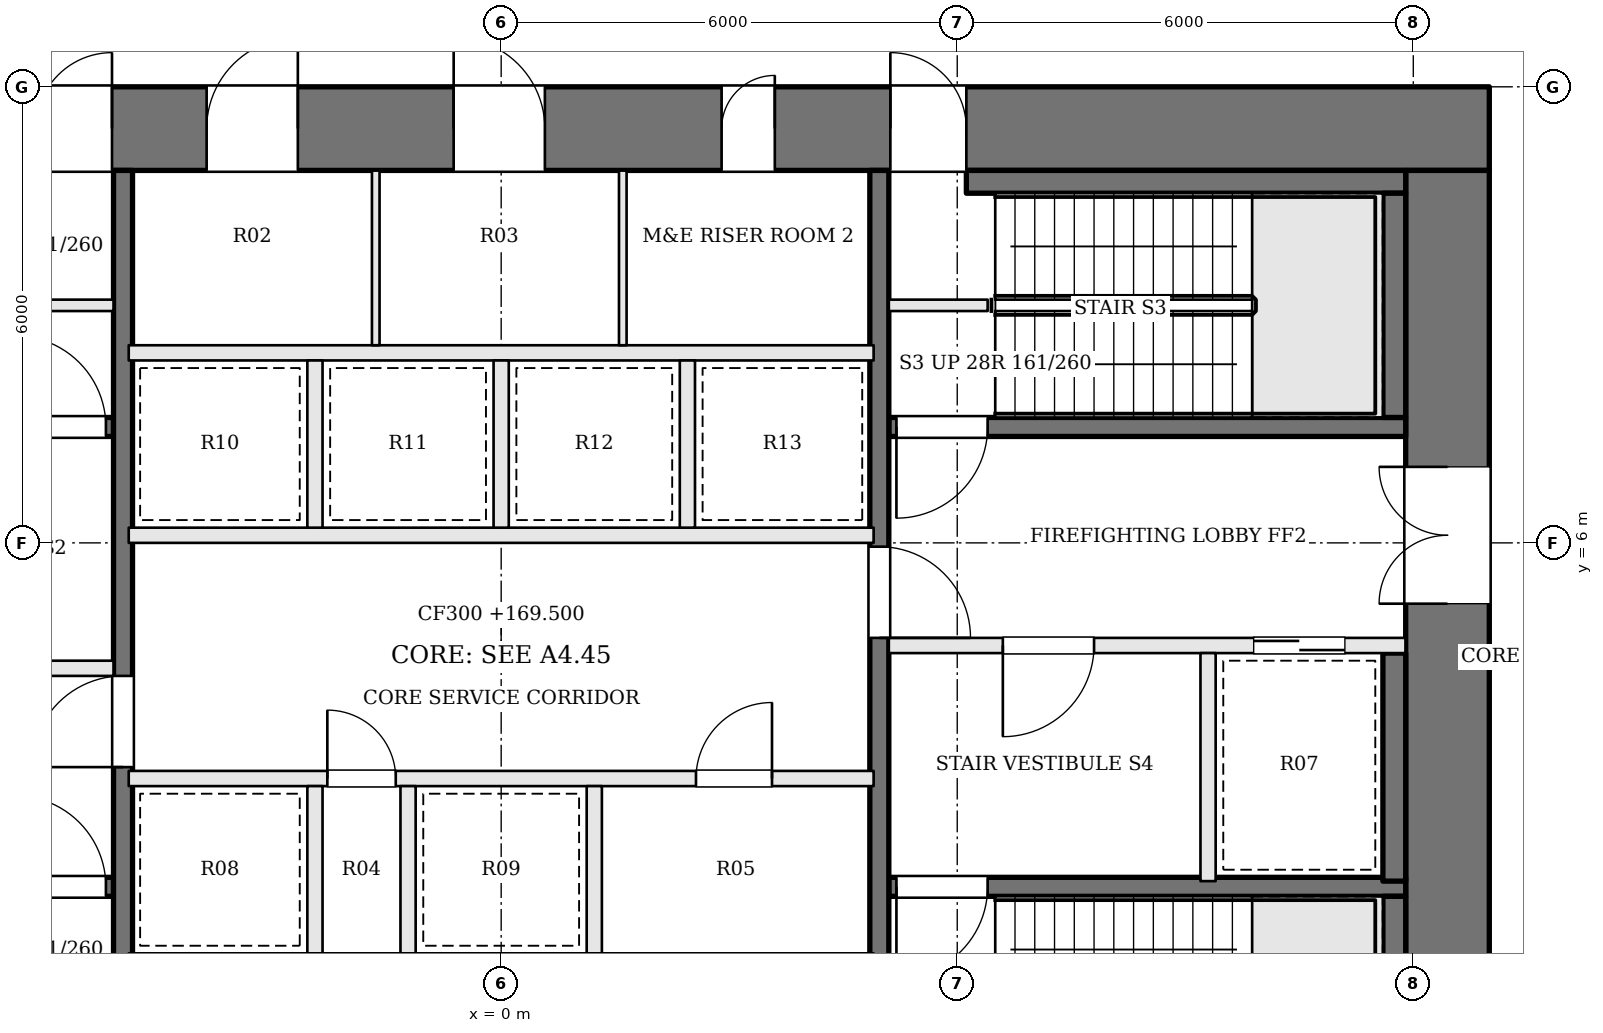
"""IFC4 building model, lengths in metres.
Left out: names, types, materials, properties, quantities, classifications, styles, units other than length and angle.
Written with IfcOpenShell. Run it as: python <this file> out.ifc"""

import sys

from ifc_helpers import new_model, si_unit, direction, frame, frame_2d, origin, place, context, subcontext, project, spatial, rectangle, extrude, element, fill, save


model = new_model("IFC4")
c1 = context("Model", 3, precision=1e-05, world=origin(), true_north=direction((0.0, 1.0)))
c2 = subcontext(c1, "Body", "Model", "MODEL_VIEW")
j1 = project(units=[si_unit("LENGTHUNIT", "METRE"), si_unit("PLANEANGLEUNIT", "RADIAN")], contexts=[c1])
p1 = place(None, origin())
s1 = spatial("IfcSite", under=j1, at=p1, CompositionType="ELEMENT")
p2 = place(p1, origin())
s2 = spatial("IfcBuilding", under=s1, at=p2, CompositionType="ELEMENT")
p3 = place(p2, frame((0.0, 0.0, 169.5)))
s3 = spatial("IfcBuildingStorey", under=s2, at=p3, CompositionType="ELEMENT", Elevation=169.5)
p4 = place(p3, frame((-13.0, 11.45, 0.0), z_axis=(0.0, 0.0, 1.0), x_axis=(1.0, 0.0, 0.0)))
e1 = element("IfcWall", 1, at=p4, inside=s3, PredefinedType="SHEAR", context=c2, shape_type="SweptSolid", body=[
    extrude(rectangle(XDim=26.0, YDim=1.1, at=frame_2d((13.0, 0.0))), origin(), (0.0, 0.0, 1.0), 4.5),
])
p5 = place(p4, frame((9.125, 0.0, 0.0)))
e2 = element("IfcOpeningElement", 2, at=p5, cuts=e1, PredefinedType="OPENING", context=c2, shape_type="SweptSolid", body=[
    extrude(rectangle(XDim=1.2, YDim=2.1, at=frame_2d((0.6, 1.05))), frame((0.0, 0.56, 0.0), z_axis=(0.0, -1.0, 0.0), x_axis=(1.0, 0.0, 0.0)), (0.0, 0.0, 1.0), 1.12),
])
p6 = place(p4, frame((12.375, 0.0, 0.0)))
e3 = element("IfcOpeningElement", 3, at=p6, cuts=e1, PredefinedType="OPENING", context=c2, shape_type="SweptSolid", body=[
    extrude(rectangle(XDim=1.2, YDim=2.1, at=frame_2d((0.6, 1.05))), frame((0.0, 0.56, 0.0), z_axis=(0.0, -1.0, 0.0), x_axis=(1.0, 0.0, 0.0)), (0.0, 0.0, 1.0), 1.12),
])
p7 = place(p4, frame((15.9, 0.0, 0.0)))
e4 = element("IfcOpeningElement", 4, at=p7, cuts=e1, PredefinedType="OPENING", context=c2, shape_type="SweptSolid", body=[
    extrude(rectangle(XDim=0.7, YDim=2.1, at=frame_2d((0.35, 1.05))), frame((0.0, 0.56, 0.0), z_axis=(0.0, -1.0, 0.0), x_axis=(1.0, 0.0, 0.0)), (0.0, 0.0, 1.0), 1.12),
])
p8 = place(p4, frame((6.88, 0.0, 0.0)))
e5 = element("IfcOpeningElement", 5, at=p8, cuts=e1, PredefinedType="OPENING", context=c2, shape_type="SweptSolid", body=[
    extrude(rectangle(XDim=1.0, YDim=2.1, at=frame_2d((0.5, 1.05))), frame((0.0, 0.56, 0.0), z_axis=(0.0, -1.0, 0.0), x_axis=(1.0, 0.0, 0.0)), (0.0, 0.0, 1.0), 1.12),
])
p9 = place(p4, frame((18.12, 0.0, 0.0)))
e6 = element("IfcOpeningElement", 6, at=p9, cuts=e1, PredefinedType="OPENING", context=c2, shape_type="SweptSolid", body=[
    extrude(rectangle(XDim=1.0, YDim=2.1, at=frame_2d((0.5, 1.05))), frame((0.0, 0.56, 0.0), z_axis=(0.0, -1.0, 0.0), x_axis=(1.0, 0.0, 0.0)), (0.0, 0.0, 1.0), 1.12),
])
p10 = place(p3, frame((12.45, -1.9, 0.0), z_axis=(0.0, 0.0, 1.0), x_axis=(0.0, 1.0, 0.0)))
e7 = element("IfcWall", 7, at=p10, inside=s3, PredefinedType="SHEAR", context=c2, shape_type="SweptSolid", body=[
    extrude(rectangle(XDim=12.8, YDim=1.1, at=frame_2d((6.4, 0.0))), origin(), (0.0, 0.0, 1.0), 4.5),
])
p11 = place(p10, frame((7.1, 0.0, 0.0)))
e8 = element("IfcOpeningElement", 8, at=p11, cuts=e7, PredefinedType="OPENING", context=c2, shape_type="SweptSolid", body=[
    extrude(rectangle(XDim=1.8, YDim=2.1, at=frame_2d((0.9, 1.05))), frame((0.0, 0.56, 0.0), z_axis=(0.0, -1.0, 0.0), x_axis=(1.0, 0.0, 0.0)), (0.0, 0.0, 1.0), 1.12),
])
for number, where, z_axis, x_axis in (
    (9, (6.4, 9.125, 0.0), (0.0, 0.0, 1.0), (-1.0, 0.0, 0.0)),
    (10, (-6.4, 9.125, 0.0), (0.0, 0.0, 1.0), (1.0, 0.0, 0.0)),
):
    element("IfcWall", number, at=place(p3, frame(where, z_axis=z_axis, x_axis=x_axis)), inside=s3, PredefinedType="SOLIDWALL", context=c2, shape_type="SweptSolid", body=[
        extrude(rectangle(XDim=1.3, YDim=0.15, at=frame_2d((0.65, 0.0))), origin(), (0.0, 0.0, 1.0), 4.3),
    ])
p12 = place(p3, frame((-11.9, 1.475, 0.0), z_axis=(0.0, 0.0, 1.0), x_axis=(1.0, 0.0, 0.0)))
e11 = element("IfcWall", 11, at=p12, inside=s3, PredefinedType="SOLIDWALL", context=c2, shape_type="SweptSolid", body=[
    extrude(rectangle(XDim=6.8, YDim=0.25, at=frame_2d((3.4, 0.0))), origin(), (0.0, 0.0, 1.0), 4.3),
])
p13 = place(p12, frame((5.5, 0.0, 0.0)))
e12 = element("IfcOpeningElement", 12, at=p13, cuts=e11, PredefinedType="OPENING", context=c2, shape_type="SweptSolid", body=[
    extrude(rectangle(XDim=1.2, YDim=2.1, at=frame_2d((0.6, 1.05))), frame((0.0, 0.135, 0.0), z_axis=(0.0, -1.0, 0.0), x_axis=(1.0, 0.0, 0.0)), (0.0, 0.0, 1.0), 0.27),
])
p14 = place(p3, frame((11.9, 7.525, 0.0), z_axis=(0.0, 0.0, 1.0), x_axis=(-1.0, 0.0, 0.0)))
e13 = element("IfcWall", 13, at=p14, inside=s3, PredefinedType="SOLIDWALL", context=c2, shape_type="SweptSolid", body=[
    extrude(rectangle(XDim=6.8, YDim=0.25, at=frame_2d((3.4, 0.0))), origin(), (0.0, 0.0, 1.0), 4.3),
])
p15 = place(p14, frame((5.5, 0.0, 0.0)))
e14 = element("IfcOpeningElement", 14, at=p15, cuts=e13, PredefinedType="OPENING", context=c2, shape_type="SweptSolid", body=[
    extrude(rectangle(XDim=1.2, YDim=2.1, at=frame_2d((0.6, 1.05))), frame((0.0, 0.135, 0.0), z_axis=(0.0, -1.0, 0.0), x_axis=(1.0, 0.0, 0.0)), (0.0, 0.0, 1.0), 0.27),
])
p16 = place(p3, frame((-11.9, 4.35, 0.0), z_axis=(0.0, 0.0, 1.0), x_axis=(1.0, 0.0, 0.0)))
e15 = element("IfcWall", 15, at=p16, inside=s3, PredefinedType="SOLIDWALL", context=c2, shape_type="SweptSolid", body=[
    extrude(rectangle(XDim=6.8, YDim=0.2, at=frame_2d((3.4, 0.0))), origin(), (0.0, 0.0, 1.0), 4.3),
])
p17 = place(p16, frame((4.1, 0.0, 0.0)))
e16 = element("IfcOpeningElement", 16, at=p17, cuts=e15, PredefinedType="OPENING", context=c2, shape_type="SweptSolid", body=[
    extrude(rectangle(XDim=1.2, YDim=2.1, at=frame_2d((0.6, 1.05))), frame((0.0, 0.11, 0.0), z_axis=(0.0, -1.0, 0.0), x_axis=(1.0, 0.0, 0.0)), (0.0, 0.0, 1.0), 0.22),
])
p18 = place(p16, frame((0.8, 0.0, 0.0)))
e17 = element("IfcOpeningElement", 17, at=p18, cuts=e15, PredefinedType="OPENING", context=c2, shape_type="SweptSolid", body=[
    extrude(rectangle(XDim=1.2, YDim=2.1, at=frame_2d((0.6, 1.05))), frame((0.0, 0.11, 0.0), z_axis=(0.0, -1.0, 0.0), x_axis=(1.0, 0.0, 0.0)), (0.0, 0.0, 1.0), 0.22),
])
p19 = place(p3, frame((11.9, 4.65, 0.0), z_axis=(0.0, 0.0, 1.0), x_axis=(-1.0, 0.0, 0.0)))
e18 = element("IfcWall", 18, at=p19, inside=s3, PredefinedType="SOLIDWALL", context=c2, shape_type="SweptSolid", body=[
    extrude(rectangle(XDim=6.8, YDim=0.2, at=frame_2d((3.4, 0.0))), origin(), (0.0, 0.0, 1.0), 4.3),
])
p20 = place(p19, frame((4.1, 0.0, 0.0)))
e19 = element("IfcOpeningElement", 19, at=p20, cuts=e18, PredefinedType="OPENING", context=c2, shape_type="SweptSolid", body=[
    extrude(rectangle(XDim=1.2, YDim=2.1, at=frame_2d((0.6, 1.05))), frame((0.0, 0.11, 0.0), z_axis=(0.0, -1.0, 0.0), x_axis=(1.0, 0.0, 0.0)), (0.0, 0.0, 1.0), 0.22),
])
p21 = place(p19, frame((0.8, 0.0, 0.0)))
e20 = element("IfcOpeningElement", 20, at=p21, cuts=e18, PredefinedType="OPENING", context=c2, shape_type="SweptSolid", body=[
    extrude(rectangle(XDim=1.2, YDim=2.1, at=frame_2d((0.6, 1.05))), frame((0.0, 0.11, 0.0), z_axis=(0.0, -1.0, 0.0), x_axis=(1.0, 0.0, 0.0)), (0.0, 0.0, 1.0), 0.22),
])
p22 = place(p3, frame((-11.9, 7.525, 0.0), z_axis=(0.0, 0.0, 1.0), x_axis=(1.0, 0.0, 0.0)))
e21 = element("IfcWall", 21, at=p22, inside=s3, PredefinedType="SOLIDWALL", context=c2, shape_type="SweptSolid", body=[
    extrude(rectangle(XDim=6.8, YDim=0.25, at=frame_2d((3.4, 0.0))), origin(), (0.0, 0.0, 1.0), 4.3),
])
p23 = place(p22, frame((5.5, 0.0, 0.0)))
e22 = element("IfcOpeningElement", 22, at=p23, cuts=e21, PredefinedType="OPENING", context=c2, shape_type="SweptSolid", body=[
    extrude(rectangle(XDim=1.2, YDim=2.1, at=frame_2d((0.6, 1.05))), frame((0.0, 0.135, 0.0), z_axis=(0.0, -1.0, 0.0), x_axis=(1.0, 0.0, 0.0)), (0.0, 0.0, 1.0), 0.27),
])
p24 = place(p3, frame((11.9, 1.475, 0.0), z_axis=(0.0, 0.0, 1.0), x_axis=(-1.0, 0.0, 0.0)))
e23 = element("IfcWall", 23, at=p24, inside=s3, PredefinedType="SOLIDWALL", context=c2, shape_type="SweptSolid", body=[
    extrude(rectangle(XDim=6.8, YDim=0.25, at=frame_2d((3.4, 0.0))), origin(), (0.0, 0.0, 1.0), 4.3),
])
p25 = place(p24, frame((5.5, 0.0, 0.0)))
e24 = element("IfcOpeningElement", 24, at=p25, cuts=e23, PredefinedType="OPENING", context=c2, shape_type="SweptSolid", body=[
    extrude(rectangle(XDim=1.2, YDim=2.1, at=frame_2d((0.6, 1.05))), frame((0.0, 0.135, 0.0), z_axis=(0.0, -1.0, 0.0), x_axis=(1.0, 0.0, 0.0)), (0.0, 0.0, 1.0), 0.27),
])
p26 = place(p3, frame((9.3, 4.55, 0.0), z_axis=(0.0, 0.0, 1.0), x_axis=(0.0, -1.0, 0.0)))
e25 = element("IfcWall", 25, at=p26, inside=s3, PredefinedType="SOLIDWALL", context=c2, shape_type="SweptSolid", body=[
    extrude(rectangle(XDim=3.0, YDim=0.2, at=frame_2d((1.5, 0.0))), origin(), (0.0, 0.0, 1.0), 4.3),
])
p27 = place(p3, frame((-4.975, -1.9, 0.0), z_axis=(0.0, 0.0, 1.0), x_axis=(0.0, 1.0, 0.0)))
e26 = element("IfcWall", 26, at=p27, inside=s3, PredefinedType="SOLIDWALL", context=c2, shape_type="SweptSolid", body=[
    extrude(rectangle(XDim=12.8, YDim=0.25, at=frame_2d((6.4, 0.0))), origin(), (0.0, 0.0, 1.0), 4.3),
])
p28 = place(p27, frame((4.95, 0.0, 0.0)))
e27 = element("IfcOpeningElement", 27, at=p28, cuts=e26, PredefinedType="OPENING", context=c2, shape_type="SweptSolid", body=[
    extrude(rectangle(XDim=1.2, YDim=2.1, at=frame_2d((0.6, 1.05))), frame((0.0, 0.135, 0.0), z_axis=(0.0, -1.0, 0.0), x_axis=(1.0, 0.0, 0.0)), (0.0, 0.0, 1.0), 0.27),
])
p29 = place(p3, frame((4.975, 10.9, 0.0), z_axis=(0.0, 0.0, 1.0), x_axis=(0.0, -1.0, 0.0)))
e28 = element("IfcWall", 28, at=p29, inside=s3, PredefinedType="SOLIDWALL", context=c2, shape_type="SweptSolid", body=[
    extrude(rectangle(XDim=12.8, YDim=0.25, at=frame_2d((6.4, 0.0))), origin(), (0.0, 0.0, 1.0), 4.3),
])
p30 = place(p29, frame((4.95, 0.0, 0.0)))
e29 = element("IfcOpeningElement", 29, at=p30, cuts=e28, PredefinedType="OPENING", context=c2, shape_type="SweptSolid", body=[
    extrude(rectangle(XDim=1.2, YDim=2.1, at=frame_2d((0.6, 1.05))), frame((0.0, 0.135, 0.0), z_axis=(0.0, -1.0, 0.0), x_axis=(1.0, 0.0, 0.0)), (0.0, 0.0, 1.0), 0.27),
])
p31 = place(p3, frame((11.9, 10.75, 0.0), z_axis=(0.0, 0.0, 1.0), x_axis=(-1.0, 0.0, 0.0)))
e30 = element("IfcWall", 30, at=p31, inside=s3, PredefinedType="SOLIDWALL", context=c2, shape_type="SweptSolid", body=[
    extrude(rectangle(XDim=5.78, YDim=0.3, at=frame_2d((2.89, 0.0))), origin(), (0.0, 0.0, 1.0), 4.3),
])
p32 = place(p3, frame((11.75, 10.6, 0.0), z_axis=(0.0, 0.0, 1.0), x_axis=(0.0, -1.0, 0.0)))
e31 = element("IfcWall", 31, at=p32, inside=s3, PredefinedType="SOLIDWALL", context=c2, shape_type="SweptSolid", body=[
    extrude(rectangle(XDim=2.95, YDim=0.3, at=frame_2d((1.475, 0.0))), origin(), (0.0, 0.0, 1.0), 4.3),
])
p33 = place(p3, frame((11.75, 4.55, 0.0), z_axis=(0.0, 0.0, 1.0), x_axis=(0.0, -1.0, 0.0)))
e32 = element("IfcWall", 32, at=p33, inside=s3, PredefinedType="SOLIDWALL", context=c2, shape_type="SweptSolid", body=[
    extrude(rectangle(XDim=3.0, YDim=0.3, at=frame_2d((1.5, 0.0))), origin(), (0.0, 0.0, 1.0), 4.3),
])
p34 = place(p3, frame((11.75, 1.35, 0.0), z_axis=(0.0, 0.0, 1.0), x_axis=(0.0, -1.0, 0.0)))
e33 = element("IfcWall", 33, at=p34, inside=s3, PredefinedType="SOLIDWALL", context=c2, shape_type="SweptSolid", body=[
    extrude(rectangle(XDim=2.95, YDim=0.3, at=frame_2d((1.475, 0.0))), origin(), (0.0, 0.0, 1.0), 4.3),
])
p35 = place(p3, frame((-4.9, 2.9, 0.0), z_axis=(0.0, 0.0, 1.0), x_axis=(1.0, 0.0, 0.0)))
e34 = element("IfcWall", 34, at=p35, inside=s3, PredefinedType="SOLIDWALL", context=c2, shape_type="SweptSolid", body=[
    extrude(rectangle(XDim=9.8, YDim=0.2, at=frame_2d((4.9, 0.0))), origin(), (0.0, 0.0, 1.0), 4.3),
])
p36 = place(p35, frame((2.613, 0.0, 0.0)))
e35 = element("IfcOpeningElement", 35, at=p36, cuts=e34, PredefinedType="OPENING", context=c2, shape_type="SweptSolid", body=[
    extrude(rectangle(XDim=0.9, YDim=2.1, at=frame_2d((0.45, 1.05))), frame((0.0, 0.11, 0.0), z_axis=(0.0, -1.0, 0.0), x_axis=(1.0, 0.0, 0.0)), (0.0, 0.0, 1.0), 0.22),
])
p37 = place(p35, frame((7.463, 0.0, 0.0)))
e36 = element("IfcOpeningElement", 36, at=p37, cuts=e34, PredefinedType="OPENING", context=c2, shape_type="SweptSolid", body=[
    extrude(rectangle(XDim=1.0, YDim=2.1, at=frame_2d((0.5, 1.05))), frame((0.0, 0.11, 0.0), z_axis=(0.0, -1.0, 0.0), x_axis=(1.0, 0.0, 0.0)), (0.0, 0.0, 1.0), 0.22),
])
for number, where, z_axis, x_axis in (
    (37, (-4.9, 6.1, 0.0), (0.0, 0.0, 1.0), (1.0, 0.0, 0.0)),
    (38, (-4.9, 8.5, 0.0), (0.0, 0.0, 1.0), (1.0, 0.0, 0.0)),
):
    element("IfcWall", number, at=place(p3, frame(where, z_axis=z_axis, x_axis=x_axis)), inside=s3, PredefinedType="SOLIDWALL", context=c2, shape_type="SweptSolid", body=[
        extrude(rectangle(XDim=9.8, YDim=0.2, at=frame_2d((4.9, 0.0))), origin(), (0.0, 0.0, 1.0), 4.3),
    ])
for number, where, z_axis, x_axis in (
    (39, (-2.45, 0.6, 0.0), (0.0, 0.0, 1.0), (0.0, 1.0, 0.0)),
    (40, (-1.225, 0.6, 0.0), (0.0, 0.0, 1.0), (0.0, 1.0, 0.0)),
    (41, (1.225, 0.6, 0.0), (0.0, 0.0, 1.0), (0.0, 1.0, 0.0)),
    (42, (-2.45, 6.2, 0.0), (0.0, 0.0, 1.0), (0.0, 1.0, 0.0)),
    (43, (0.0, 6.2, 0.0), (0.0, 0.0, 1.0), (0.0, 1.0, 0.0)),
    (44, (2.45, 6.2, 0.0), (0.0, 0.0, 1.0), (0.0, 1.0, 0.0)),
):
    element("IfcWall", number, at=place(p3, frame(where, z_axis=z_axis, x_axis=x_axis)), inside=s3, PredefinedType="SOLIDWALL", context=c2, shape_type="SweptSolid", body=[
        extrude(rectangle(XDim=2.2, YDim=0.2, at=frame_2d((1.1, 0.0))), origin(), (0.0, 0.0, 1.0), 4.3),
    ])
for number, where, z_axis, x_axis in (
    (45, (-1.65, 8.6, 0.0), (0.0, 0.0, 1.0), (0.0, 1.0, 0.0)),
    (46, (1.6, 8.6, 0.0), (0.0, 0.0, 1.0), (0.0, 1.0, 0.0)),
):
    element("IfcWall", number, at=place(p3, frame(where, z_axis=z_axis, x_axis=x_axis)), inside=s3, PredefinedType="PARTITIONING", context=c2, shape_type="SweptSolid", body=[
        extrude(rectangle(XDim=2.3, YDim=0.1, at=frame_2d((1.15, 0.0))), origin(), (0.0, 0.0, 1.0), 4.3),
    ])
p38 = place(p11, origin())
e47 = element("IfcDoor", 47, at=p38, inside=s3, OperationType="DOUBLE_DOOR_SINGLE_SWING", PredefinedType="DOOR", context=c2, shape_type="SweptSolid", body=[
    extrude(rectangle(XDim=1.8, YDim=2.1, at=frame_2d((0.9, 1.05))), frame((0.0, 0.025, 0.0), z_axis=(0.0, -1.0, 0.0), x_axis=(1.0, 0.0, 0.0)), (0.0, 0.0, 1.0), 0.05),
])
fill(e8, e47)
p39 = place(p28, origin())
e48 = element("IfcDoor", 48, at=p39, inside=s3, OperationType="SINGLE_SWING_LEFT", PredefinedType="DOOR", context=c2, shape_type="SweptSolid", body=[
    extrude(rectangle(XDim=1.2, YDim=2.1, at=frame_2d((0.6, 1.05))), frame((0.0, 0.025, 0.0), z_axis=(0.0, -1.0, 0.0), x_axis=(1.0, 0.0, 0.0)), (0.0, 0.0, 1.0), 0.05),
])
fill(e27, e48)
p40 = place(p30, origin())
e49 = element("IfcDoor", 49, at=p40, inside=s3, OperationType="SINGLE_SWING_RIGHT", PredefinedType="DOOR", context=c2, shape_type="SweptSolid", body=[
    extrude(rectangle(XDim=1.2, YDim=2.1, at=frame_2d((0.6, 1.05))), frame((0.0, 0.025, 0.0), z_axis=(0.0, -1.0, 0.0), x_axis=(1.0, 0.0, 0.0)), (0.0, 0.0, 1.0), 0.05),
])
fill(e29, e49)
p41 = place(p20, origin())
e50 = element("IfcDoor", 50, at=p41, inside=s3, OperationType="SINGLE_SWING_RIGHT", PredefinedType="DOOR", context=c2, shape_type="SweptSolid", body=[
    extrude(rectangle(XDim=1.2, YDim=2.1, at=frame_2d((0.6, 1.05))), frame((0.0, 0.025, 0.0), z_axis=(0.0, -1.0, 0.0), x_axis=(1.0, 0.0, 0.0)), (0.0, 0.0, 1.0), 0.05),
])
fill(e19, e50)
p42 = place(p13, origin())
e51 = element("IfcDoor", 51, at=p42, inside=s3, OperationType="SINGLE_SWING_LEFT", PredefinedType="DOOR", context=c2, shape_type="SweptSolid", body=[
    extrude(rectangle(XDim=1.2, YDim=2.1, at=frame_2d((0.6, 1.05))), frame((0.0, 0.025, 0.0), z_axis=(0.0, -1.0, 0.0), x_axis=(1.0, 0.0, 0.0)), (0.0, 0.0, 1.0), 0.05),
])
fill(e12, e51)
p43 = place(p15, origin())
e52 = element("IfcDoor", 52, at=p43, inside=s3, OperationType="SINGLE_SWING_RIGHT", PredefinedType="DOOR", context=c2, shape_type="SweptSolid", body=[
    extrude(rectangle(XDim=1.2, YDim=2.1, at=frame_2d((0.6, 1.05))), frame((0.0, 0.025, 0.0), z_axis=(0.0, -1.0, 0.0), x_axis=(1.0, 0.0, 0.0)), (0.0, 0.0, 1.0), 0.05),
])
fill(e14, e52)
p44 = place(p23, origin())
e53 = element("IfcDoor", 53, at=p44, inside=s3, OperationType="SINGLE_SWING_LEFT", PredefinedType="DOOR", context=c2, shape_type="SweptSolid", body=[
    extrude(rectangle(XDim=1.2, YDim=2.1, at=frame_2d((0.6, 1.05))), frame((0.0, 0.025, 0.0), z_axis=(0.0, -1.0, 0.0), x_axis=(1.0, 0.0, 0.0)), (0.0, 0.0, 1.0), 0.05),
])
fill(e22, e53)
p45 = place(p25, origin())
e54 = element("IfcDoor", 54, at=p45, inside=s3, OperationType="SINGLE_SWING_RIGHT", PredefinedType="DOOR", context=c2, shape_type="SweptSolid", body=[
    extrude(rectangle(XDim=1.2, YDim=2.1, at=frame_2d((0.6, 1.05))), frame((0.0, 0.025, 0.0), z_axis=(0.0, -1.0, 0.0), x_axis=(1.0, 0.0, 0.0)), (0.0, 0.0, 1.0), 0.05),
])
fill(e24, e54)
p46 = place(p21, origin())
e55 = element("IfcDoor", 55, at=p46, inside=s3, OperationType="SLIDING_TO_RIGHT", PredefinedType="DOOR", context=c2, shape_type="SweptSolid", body=[
    extrude(rectangle(XDim=1.2, YDim=2.1, at=frame_2d((0.6, 1.05))), frame((0.0, 0.025, 0.0), z_axis=(0.0, -1.0, 0.0), x_axis=(1.0, 0.0, 0.0)), (0.0, 0.0, 1.0), 0.05),
])
fill(e20, e55)
p47 = place(p36, origin())
e56 = element("IfcDoor", 56, at=p47, inside=s3, OperationType="SINGLE_SWING_LEFT", PredefinedType="DOOR", context=c2, shape_type="SweptSolid", body=[
    extrude(rectangle(XDim=0.9, YDim=2.1, at=frame_2d((0.45, 1.05))), frame((0.0, 0.025, 0.0), z_axis=(0.0, -1.0, 0.0), x_axis=(1.0, 0.0, 0.0)), (0.0, 0.0, 1.0), 0.05),
])
fill(e35, e56)
p48 = place(p37, origin())
e57 = element("IfcDoor", 57, at=p48, inside=s3, OperationType="SINGLE_SWING_RIGHT", PredefinedType="DOOR", context=c2, shape_type="SweptSolid", body=[
    extrude(rectangle(XDim=1.0, YDim=2.1, at=frame_2d((0.5, 1.05))), frame((0.0, 0.025, 0.0), z_axis=(0.0, -1.0, 0.0), x_axis=(1.0, 0.0, 0.0)), (0.0, 0.0, 1.0), 0.05),
])
fill(e36, e57)
p49 = place(p5, origin())
e58 = element("IfcDoor", 58, at=p49, inside=s3, OperationType="SINGLE_SWING_RIGHT", PredefinedType="DOOR", context=c2, shape_type="SweptSolid", body=[
    extrude(rectangle(XDim=1.2, YDim=2.1, at=frame_2d((0.6, 1.05))), frame((0.0, 0.025, 0.0), z_axis=(0.0, -1.0, 0.0), x_axis=(1.0, 0.0, 0.0)), (0.0, 0.0, 1.0), 0.05),
])
fill(e2, e58)
p50 = place(p6, origin())
e59 = element("IfcDoor", 59, at=p50, inside=s3, OperationType="SINGLE_SWING_LEFT", PredefinedType="DOOR", context=c2, shape_type="SweptSolid", body=[
    extrude(rectangle(XDim=1.2, YDim=2.1, at=frame_2d((0.6, 1.05))), frame((0.0, 0.025, 0.0), z_axis=(0.0, -1.0, 0.0), x_axis=(1.0, 0.0, 0.0)), (0.0, 0.0, 1.0), 0.05),
])
fill(e3, e59)
p51 = place(p7, origin())
e60 = element("IfcDoor", 60, at=p51, inside=s3, OperationType="SINGLE_SWING_RIGHT", PredefinedType="DOOR", context=c2, shape_type="SweptSolid", body=[
    extrude(rectangle(XDim=0.7, YDim=2.1, at=frame_2d((0.35, 1.05))), frame((0.0, 0.025, 0.0), z_axis=(0.0, -1.0, 0.0), x_axis=(1.0, 0.0, 0.0)), (0.0, 0.0, 1.0), 0.05),
])
fill(e4, e60)
p52 = place(p8, origin())
e61 = element("IfcDoor", 61, at=p52, inside=s3, OperationType="SINGLE_SWING_RIGHT", PredefinedType="DOOR", context=c2, shape_type="SweptSolid", body=[
    extrude(rectangle(XDim=1.0, YDim=2.1, at=frame_2d((0.5, 1.05))), frame((0.0, 0.025, 0.0), z_axis=(0.0, -1.0, 0.0), x_axis=(1.0, 0.0, 0.0)), (0.0, 0.0, 1.0), 0.05),
])
fill(e5, e61)
p53 = place(p9, origin())
e62 = element("IfcDoor", 62, at=p53, inside=s3, OperationType="SINGLE_SWING_LEFT", PredefinedType="DOOR", context=c2, shape_type="SweptSolid", body=[
    extrude(rectangle(XDim=1.0, YDim=2.1, at=frame_2d((0.5, 1.05))), frame((0.0, 0.025, 0.0), z_axis=(0.0, -1.0, 0.0), x_axis=(1.0, 0.0, 0.0)), (0.0, 0.0, 1.0), 0.05),
])
fill(e6, e62)
save(model, sys.argv[1])
